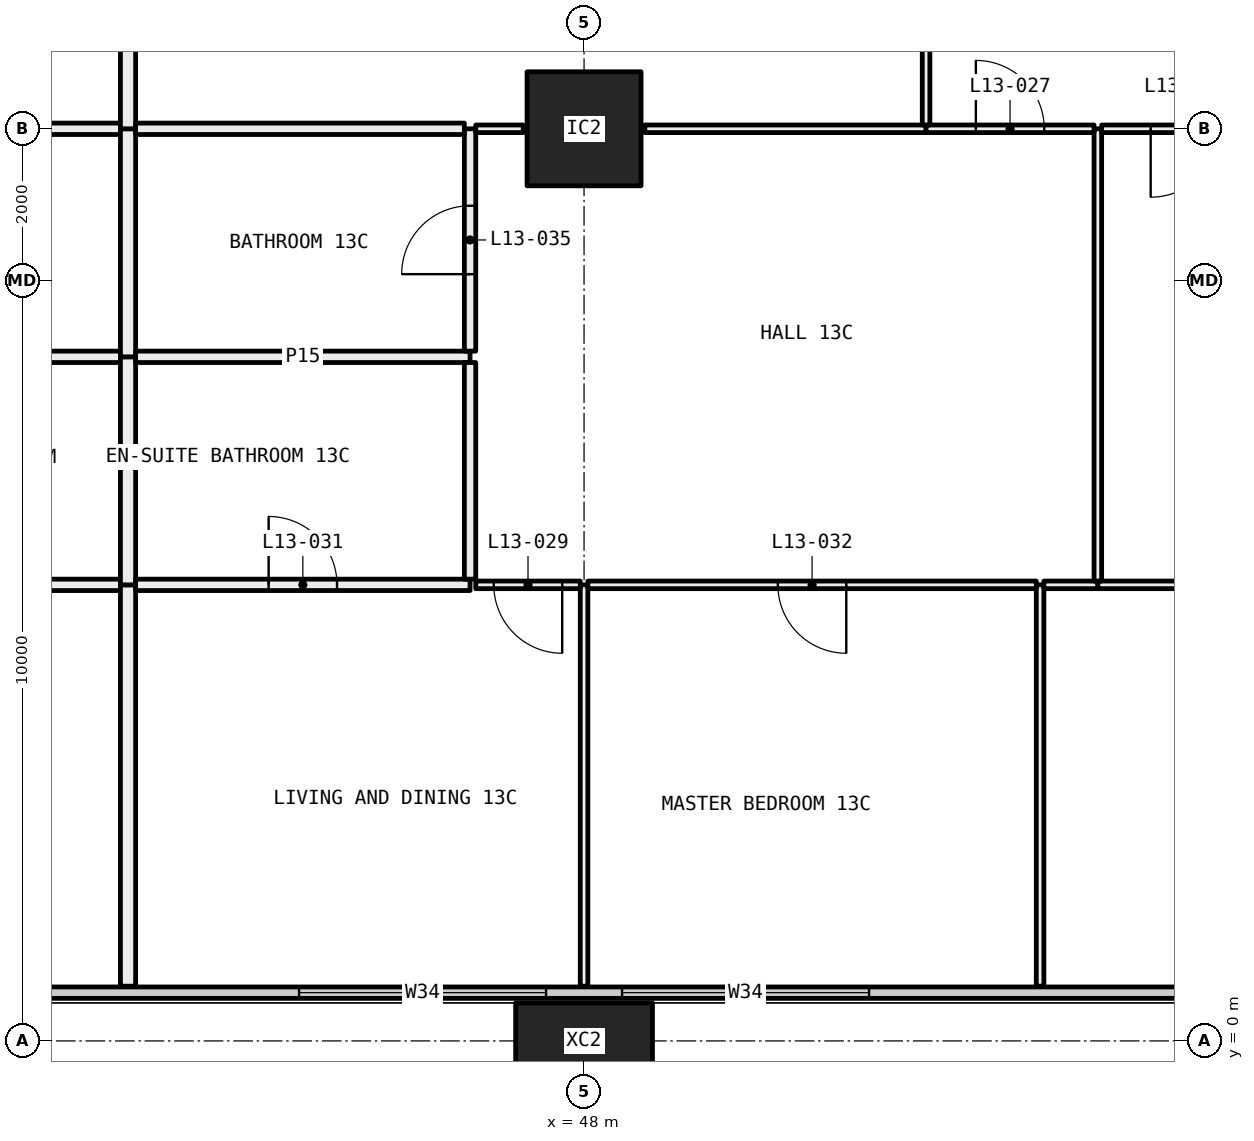
"""IFC4 building model, lengths in metres.
Left out: names, types, materials, properties, quantities, classifications, styles, units other than length and angle.
Written with IfcOpenShell. Run it as: python <this file> out.ifc"""

import sys

from ifc_helpers import new_model, si_unit, direction, frame, frame_2d, origin, origin_2d, place, context, subcontext, project, spatial, rectangle, hollow_rectangle, extrude, element, fill, save


model = new_model("IFC4")
c1 = context("Model", 3, precision=1e-05, world=origin(), true_north=direction((0.0, 1.0)))
c2 = subcontext(c1, "Body", "Model", "MODEL_VIEW")
j1 = project(units=[si_unit("LENGTHUNIT", "METRE"), si_unit("PLANEANGLEUNIT", "RADIAN")], contexts=[c1])
p1 = place(None, origin())
s1 = spatial("IfcSite", under=j1, at=p1, CompositionType="ELEMENT")
p2 = place(p1, origin())
s2 = spatial("IfcBuilding", under=s1, at=p2, CompositionType="ELEMENT")
p3 = place(p2, frame((0.0, 0.0, 57.6)))
s3 = spatial("IfcBuildingStorey", under=s2, at=p3, CompositionType="ELEMENT", Elevation=57.6)
p4 = place(p3, frame((48.0, 0.0, -0.4), z_axis=(0.0, 0.0, 1.0), x_axis=(1.0, 0.0, 0.0)))
e1 = element("IfcColumn", 1, at=p4, inside=s3, PredefinedType="COLUMN", context=c2, shape_type="SweptSolid", body=[
    extrude(hollow_rectangle(XDim=1.8, YDim=1.0, WallThickness=0.07, at=origin_2d()), origin(), (0.0, 0.0, 1.0), 3.45),
])
p5 = place(p3, frame((48.0, 12.0, 0.0), z_axis=(0.0, 0.0, 1.0), x_axis=(1.0, 0.0, 0.0)))
e2 = element("IfcColumn", 2, at=p5, inside=s3, PredefinedType="COLUMN", context=c2, shape_type="SweptSolid", body=[
    extrude(hollow_rectangle(XDim=1.5, YDim=1.5, WallThickness=0.065, at=origin_2d()), origin(), (0.0, 0.0, 1.0), 3.05),
])
p6 = place(p3, frame((6.56, 0.635, 0.0), z_axis=(0.0, 0.0, 1.0), x_axis=(1.0, 0.0, 0.0)))
e3 = element("IfcWall", 3, at=p6, inside=s3, PredefinedType="ELEMENTEDWALL", context=c2, shape_type="SweptSolid", body=[
    extrude(rectangle(XDim=58.88, YDim=0.15, at=frame_2d((29.44, 0.0))), origin(), (0.0, 0.0, 1.0), 3.05),
])
p7 = place(p6, frame((0.44, 0.0, 0.45)))
e4 = element("IfcOpeningElement", 4, at=p7, cuts=e3, PredefinedType="OPENING", context=c2, shape_type="SweptSolid", body=[
    extrude(rectangle(XDim=4.5, YDim=2.55, at=frame_2d((2.25, 1.275))), frame((0.0, 0.085, 0.0), z_axis=(0.0, -1.0, 0.0), x_axis=(1.0, 0.0, 0.0)), (0.0, 0.0, 1.0), 0.17),
])
p8 = place(p6, frame((5.94, 0.0, 0.45)))
e5 = element("IfcOpeningElement", 5, at=p8, cuts=e3, PredefinedType="OPENING", context=c2, shape_type="SweptSolid", body=[
    extrude(rectangle(XDim=3.25, YDim=2.55, at=frame_2d((1.625, 1.275))), frame((0.0, 0.085, 0.0), z_axis=(0.0, -1.0, 0.0), x_axis=(1.0, 0.0, 0.0)), (0.0, 0.0, 1.0), 0.17),
])
p9 = place(p6, frame((13.69, 0.0, 0.45)))
e6 = element("IfcOpeningElement", 6, at=p9, cuts=e3, PredefinedType="OPENING", context=c2, shape_type="SweptSolid", body=[
    extrude(rectangle(XDim=3.25, YDim=2.55, at=frame_2d((1.625, 1.275))), frame((0.0, 0.085, 0.0), z_axis=(0.0, -1.0, 0.0), x_axis=(1.0, 0.0, 0.0)), (0.0, 0.0, 1.0), 0.17),
])
p10 = place(p6, frame((17.94, 0.0, 0.45)))
e7 = element("IfcOpeningElement", 7, at=p10, cuts=e3, PredefinedType="OPENING", context=c2, shape_type="SweptSolid", body=[
    extrude(rectangle(XDim=3.25, YDim=2.55, at=frame_2d((1.625, 1.275))), frame((0.0, 0.085, 0.0), z_axis=(0.0, -1.0, 0.0), x_axis=(1.0, 0.0, 0.0)), (0.0, 0.0, 1.0), 0.17),
])
p11 = place(p6, frame((26.94, 0.0, 0.45)))
e8 = element("IfcOpeningElement", 8, at=p11, cuts=e3, PredefinedType="OPENING", context=c2, shape_type="SweptSolid", body=[
    extrude(rectangle(XDim=2.0, YDim=2.55, at=frame_2d((1.0, 1.275))), frame((0.0, 0.085, 0.0), z_axis=(0.0, -1.0, 0.0), x_axis=(1.0, 0.0, 0.0)), (0.0, 0.0, 1.0), 0.17),
])
p12 = place(p6, frame((29.94, 0.0, 0.45)))
e9 = element("IfcOpeningElement", 9, at=p12, cuts=e3, PredefinedType="OPENING", context=c2, shape_type="SweptSolid", body=[
    extrude(rectangle(XDim=3.25, YDim=2.55, at=frame_2d((1.625, 1.275))), frame((0.0, 0.085, 0.0), z_axis=(0.0, -1.0, 0.0), x_axis=(1.0, 0.0, 0.0)), (0.0, 0.0, 1.0), 0.17),
])
p13 = place(p6, frame((37.69, 0.0, 0.45)))
e10 = element("IfcOpeningElement", 10, at=p13, cuts=e3, PredefinedType="OPENING", context=c2, shape_type="SweptSolid", body=[
    extrude(rectangle(XDim=3.25, YDim=2.55, at=frame_2d((1.625, 1.275))), frame((0.0, 0.085, 0.0), z_axis=(0.0, -1.0, 0.0), x_axis=(1.0, 0.0, 0.0)), (0.0, 0.0, 1.0), 0.17),
])
p14 = place(p6, frame((41.94, 0.0, 0.45)))
e11 = element("IfcOpeningElement", 11, at=p14, cuts=e3, PredefinedType="OPENING", context=c2, shape_type="SweptSolid", body=[
    extrude(rectangle(XDim=3.25, YDim=2.55, at=frame_2d((1.625, 1.275))), frame((0.0, 0.085, 0.0), z_axis=(0.0, -1.0, 0.0), x_axis=(1.0, 0.0, 0.0)), (0.0, 0.0, 1.0), 0.17),
])
p15 = place(p6, frame((50.94, 0.0, 0.45)))
e12 = element("IfcOpeningElement", 12, at=p15, cuts=e3, PredefinedType="OPENING", context=c2, shape_type="SweptSolid", body=[
    extrude(rectangle(XDim=2.0, YDim=2.55, at=frame_2d((1.0, 1.275))), frame((0.0, 0.085, 0.0), z_axis=(0.0, -1.0, 0.0), x_axis=(1.0, 0.0, 0.0)), (0.0, 0.0, 1.0), 0.17),
])
p16 = place(p6, frame((53.94, 0.0, 0.45)))
e13 = element("IfcOpeningElement", 13, at=p16, cuts=e3, PredefinedType="OPENING", context=c2, shape_type="SweptSolid", body=[
    extrude(rectangle(XDim=4.5, YDim=2.55, at=frame_2d((2.25, 1.275))), frame((0.0, 0.085, 0.0), z_axis=(0.0, -1.0, 0.0), x_axis=(1.0, 0.0, 0.0)), (0.0, 0.0, 1.0), 0.17),
])
p17 = place(p3, frame((41.9, 6.0, 0.0), z_axis=(0.0, 0.0, 1.0), x_axis=(-1.0, 0.0, 0.0)))
e14 = element("IfcWall", 14, at=p17, inside=s3, PredefinedType="PARTITIONING", context=c2, shape_type="SweptSolid", body=[
    extrude(rectangle(XDim=4.4, YDim=0.15, at=frame_2d((2.2, 0.0))), origin(), (0.0, 0.0, 1.0), 3.05),
])
p18 = place(p3, frame((42.0, 0.72, 0.0), z_axis=(0.0, 0.0, 1.0), x_axis=(0.0, 1.0, 0.0)))
e15 = element("IfcWall", 15, at=p18, inside=s3, PredefinedType="PARTITIONING", context=c2, shape_type="SweptSolid", body=[
    extrude(rectangle(XDim=5.28, YDim=0.2, at=frame_2d((2.64, 0.0))), origin(), (0.0, 0.0, 1.0), 3.05),
])
p19 = place(p3, frame((41.9, 9.0, 0.0), z_axis=(0.0, 0.0, 1.0), x_axis=(-1.0, 0.0, 0.0)))
e16 = element("IfcWall", 16, at=p19, inside=s3, PredefinedType="PARTITIONING", context=c2, shape_type="SweptSolid", body=[
    extrude(rectangle(XDim=4.325, YDim=0.15, at=frame_2d((2.163, 0.0))), origin(), (0.0, 0.0, 1.0), 3.05),
])
p20 = place(p3, frame((42.0, 6.0, 0.0), z_axis=(0.0, 0.0, 1.0), x_axis=(0.0, 1.0, 0.0)))
e17 = element("IfcWall", 17, at=p20, inside=s3, PredefinedType="PARTITIONING", context=c2, shape_type="SweptSolid", body=[
    extrude(rectangle(XDim=3.0, YDim=0.2, at=frame_2d((1.5, 0.0))), origin(), (0.0, 0.0, 1.0), 3.05),
])
p21 = place(p3, frame((41.9, 12.0, 0.0), z_axis=(0.0, 0.0, 1.0), x_axis=(-1.0, 0.0, 0.0)))
e18 = element("IfcWall", 18, at=p21, inside=s3, PredefinedType="PARTITIONING", context=c2, shape_type="SweptSolid", body=[
    extrude(rectangle(XDim=4.325, YDim=0.15, at=frame_2d((2.163, 0.0))), origin(), (0.0, 0.0, 1.0), 2.45),
])
p22 = place(p3, frame((42.0, 9.0, 0.0), z_axis=(0.0, 0.0, 1.0), x_axis=(0.0, 1.0, 0.0)))
e19 = element("IfcWall", 19, at=p22, inside=s3, PredefinedType="PARTITIONING", context=c2, shape_type="SweptSolid", body=[
    extrude(rectangle(XDim=3.0, YDim=0.2, at=frame_2d((1.5, 0.0))), origin(), (0.0, 0.0, 1.0), 2.45),
])
p23 = place(p3, frame((42.0, 12.0, 0.0), z_axis=(0.0, 0.0, 1.0), x_axis=(0.0, 1.0, 0.0)))
e20 = element("IfcWall", 20, at=p23, inside=s3, PredefinedType="PARTITIONING", context=c2, shape_type="SweptSolid", body=[
    extrude(rectangle(XDim=5.9, YDim=0.2, at=frame_2d((2.95, 0.0))), origin(), (0.0, 0.0, 1.0), 2.45),
])
p24 = place(p3, frame((48.0, 0.72, 0.0), z_axis=(0.0, 0.0, 1.0), x_axis=(0.0, 1.0, 0.0)))
e21 = element("IfcWall", 21, at=p24, inside=s3, PredefinedType="PARTITIONING", context=c2, shape_type="SweptSolid", body=[
    extrude(rectangle(XDim=5.28, YDim=0.1, at=frame_2d((2.64, 0.0))), origin(), (0.0, 0.0, 1.0), 2.45),
])
p25 = place(p3, frame((46.5, 6.0, 0.0), z_axis=(0.0, 0.0, 1.0), x_axis=(-1.0, 0.0, 0.0)))
e22 = element("IfcWall", 22, at=p25, inside=s3, PredefinedType="PARTITIONING", context=c2, shape_type="SweptSolid", body=[
    extrude(rectangle(XDim=4.4, YDim=0.15, at=frame_2d((2.2, 0.0))), origin(), (0.0, 0.0, 1.0), 3.05),
])
p26 = place(p25, frame((1.75, 0.0, 0.0)))
e23 = element("IfcOpeningElement", 23, at=p26, cuts=e22, PredefinedType="OPENING", context=c2, shape_type="SweptSolid", body=[
    extrude(rectangle(XDim=0.9, YDim=2.1, at=frame_2d((0.45, 1.05))), frame((0.0, 0.085, 0.0), z_axis=(0.0, -1.0, 0.0), x_axis=(1.0, 0.0, 0.0)), (0.0, 0.0, 1.0), 0.17),
])
p27 = place(p3, frame((47.95, 6.0, 0.0), z_axis=(0.0, 0.0, 1.0), x_axis=(-1.0, 0.0, 0.0)))
e24 = element("IfcWall", 24, at=p27, inside=s3, PredefinedType="PARTITIONING", context=c2, shape_type="SweptSolid", body=[
    extrude(rectangle(XDim=1.375, YDim=0.1, at=frame_2d((0.688, 0.0))), origin(), (0.0, 0.0, 1.0), 2.45),
])
p28 = place(p27, frame((0.238, 0.0, 0.0)))
e25 = element("IfcOpeningElement", 25, at=p28, cuts=e24, PredefinedType="OPENING", context=c2, shape_type="SweptSolid", body=[
    extrude(rectangle(XDim=0.9, YDim=2.1, at=frame_2d((0.45, 1.05))), frame((0.0, 0.06, 0.0), z_axis=(0.0, -1.0, 0.0), x_axis=(1.0, 0.0, 0.0)), (0.0, 0.0, 1.0), 0.12),
])
p29 = place(p3, frame((54.0, 0.72, 0.0), z_axis=(0.0, 0.0, 1.0), x_axis=(0.0, 1.0, 0.0)))
e26 = element("IfcWall", 26, at=p29, inside=s3, PredefinedType="PARTITIONING", context=c2, shape_type="SweptSolid", body=[
    extrude(rectangle(XDim=5.28, YDim=0.1, at=frame_2d((2.64, 0.0))), origin(), (0.0, 0.0, 1.0), 3.05),
])
p30 = place(p3, frame((53.95, 6.0, 0.0), z_axis=(0.0, 0.0, 1.0), x_axis=(-1.0, 0.0, 0.0)))
e27 = element("IfcWall", 27, at=p30, inside=s3, PredefinedType="PARTITIONING", context=c2, shape_type="SweptSolid", body=[
    extrude(rectangle(XDim=5.9, YDim=0.1, at=frame_2d((2.95, 0.0))), origin(), (0.0, 0.0, 1.0), 2.45),
])
p31 = place(p30, frame((2.5, 0.0, 0.0)))
e28 = element("IfcOpeningElement", 28, at=p31, cuts=e27, PredefinedType="OPENING", context=c2, shape_type="SweptSolid", body=[
    extrude(rectangle(XDim=0.9, YDim=2.1, at=frame_2d((0.45, 1.05))), frame((0.0, 0.06, 0.0), z_axis=(0.0, -1.0, 0.0), x_axis=(1.0, 0.0, 0.0)), (0.0, 0.0, 1.0), 0.12),
])
p32 = place(p3, frame((54.76, 6.0, 0.0), z_axis=(0.0, 0.0, 1.0), x_axis=(-1.0, 0.0, 0.0)))
e29 = element("IfcWall", 29, at=p32, inside=s3, PredefinedType="PARTITIONING", context=c2, shape_type="SweptSolid", body=[
    extrude(rectangle(XDim=0.71, YDim=0.1, at=frame_2d((0.355, 0.0))), origin(), (0.0, 0.0, 1.0), 3.05),
])
p33 = place(p3, frame((59.95, 6.0, 0.0), z_axis=(0.0, 0.0, 1.0), x_axis=(-1.0, 0.0, 0.0)))
e30 = element("IfcWall", 30, at=p33, inside=s3, PredefinedType="PARTITIONING", context=c2, shape_type="SweptSolid", body=[
    extrude(rectangle(XDim=5.19, YDim=0.1, at=frame_2d((2.595, 0.0))), origin(), (0.0, 0.0, 1.0), 2.45),
])
p34 = place(p33, frame((2.145, 0.0, 0.0)))
e31 = element("IfcOpeningElement", 31, at=p34, cuts=e30, PredefinedType="OPENING", context=c2, shape_type="SweptSolid", body=[
    extrude(rectangle(XDim=0.9, YDim=2.1, at=frame_2d((0.45, 1.05))), frame((0.0, 0.06, 0.0), z_axis=(0.0, -1.0, 0.0), x_axis=(1.0, 0.0, 0.0)), (0.0, 0.0, 1.0), 0.12),
])
p35 = place(p3, frame((46.5, 9.0, 0.0), z_axis=(0.0, 0.0, 1.0), x_axis=(-1.0, 0.0, 0.0)))
e32 = element("IfcWall", 32, at=p35, inside=s3, PredefinedType="PARTITIONING", context=c2, shape_type="SweptSolid", body=[
    extrude(rectangle(XDim=4.4, YDim=0.15, at=frame_2d((2.2, 0.0))), origin(), (0.0, 0.0, 1.0), 3.05),
])
p36 = place(p3, frame((46.5, 6.075, 0.0), z_axis=(0.0, 0.0, 1.0), x_axis=(0.0, 1.0, 0.0)))
e33 = element("IfcWall", 33, at=p36, inside=s3, PredefinedType="PARTITIONING", context=c2, shape_type="SweptSolid", body=[
    extrude(rectangle(XDim=2.85, YDim=0.15, at=frame_2d((1.425, 0.0))), origin(), (0.0, 0.0, 1.0), 3.05),
])
p37 = place(p3, frame((46.5, 9.075, 0.0), z_axis=(0.0, 0.0, 1.0), x_axis=(0.0, 1.0, 0.0)))
e34 = element("IfcWall", 34, at=p37, inside=s3, PredefinedType="PARTITIONING", context=c2, shape_type="SweptSolid", body=[
    extrude(rectangle(XDim=2.925, YDim=0.15, at=frame_2d((1.462, 0.0))), origin(), (0.0, 0.0, 1.0), 2.45),
])
p38 = place(p37, frame((1.012, 0.0, 0.0)))
e35 = element("IfcOpeningElement", 35, at=p38, cuts=e34, PredefinedType="OPENING", context=c2, shape_type="SweptSolid", body=[
    extrude(rectangle(XDim=0.9, YDim=2.1, at=frame_2d((0.45, 1.05))), frame((0.0, 0.085, 0.0), z_axis=(0.0, -1.0, 0.0), x_axis=(1.0, 0.0, 0.0)), (0.0, 0.0, 1.0), 0.17),
])
p39 = place(p3, frame((46.425, 12.0, 0.0), z_axis=(0.0, 0.0, 1.0), x_axis=(-1.0, 0.0, 0.0)))
e36 = element("IfcWall", 36, at=p39, inside=s3, PredefinedType="PARTITIONING", context=c2, shape_type="SweptSolid", body=[
    extrude(rectangle(XDim=4.325, YDim=0.15, at=frame_2d((2.163, 0.0))), origin(), (0.0, 0.0, 1.0), 2.45),
])
p40 = place(p3, frame((54.76, 6.05, 0.0), z_axis=(0.0, 0.0, 1.0), x_axis=(0.0, 1.0, 0.0)))
e37 = element("IfcWall", 37, at=p40, inside=s3, PredefinedType="PARTITIONING", context=c2, shape_type="SweptSolid", body=[
    extrude(rectangle(XDim=5.95, YDim=0.1, at=frame_2d((2.975, 0.0))), origin(), (0.0, 0.0, 1.0), 2.45),
])
p41 = place(p3, frame((47.2, 12.0, 0.0), z_axis=(0.0, 0.0, 1.0), x_axis=(-1.0, 0.0, 0.0)))
e38 = element("IfcWall", 38, at=p41, inside=s3, PredefinedType="PARTITIONING", context=c2, shape_type="SweptSolid", body=[
    extrude(rectangle(XDim=0.625, YDim=0.1, at=frame_2d((0.312, 0.0))), origin(), (0.0, 0.0, 1.0), 2.45),
])
p42 = place(p3, frame((52.5, 12.0, 0.0), z_axis=(0.0, 0.0, 1.0), x_axis=(-1.0, 0.0, 0.0)))
e39 = element("IfcWall", 39, at=p42, inside=s3, PredefinedType="PARTITIONING", context=c2, shape_type="SweptSolid", body=[
    extrude(rectangle(XDim=3.7, YDim=0.1, at=frame_2d((1.85, 0.0))), origin(), (0.0, 0.0, 1.0), 2.45),
])
p43 = place(p3, frame((54.71, 12.0, 0.0), z_axis=(0.0, 0.0, 1.0), x_axis=(-1.0, 0.0, 0.0)))
e40 = element("IfcWall", 40, at=p43, inside=s3, PredefinedType="PARTITIONING", context=c2, shape_type="SweptSolid", body=[
    extrude(rectangle(XDim=2.21, YDim=0.1, at=frame_2d((1.105, 0.0))), origin(), (0.0, 0.0, 1.0), 2.45),
])
p44 = place(p43, frame((0.655, 0.0, 0.0)))
e41 = element("IfcOpeningElement", 41, at=p44, cuts=e40, PredefinedType="OPENING", context=c2, shape_type="SweptSolid", body=[
    extrude(rectangle(XDim=0.9, YDim=2.1, at=frame_2d((0.45, 1.05))), frame((0.0, 0.06, 0.0), z_axis=(0.0, -1.0, 0.0), x_axis=(1.0, 0.0, 0.0)), (0.0, 0.0, 1.0), 0.12),
])
p45 = place(p3, frame((57.0, 12.0, 0.0), z_axis=(0.0, 0.0, 1.0), x_axis=(-1.0, 0.0, 0.0)))
e42 = element("IfcWall", 42, at=p45, inside=s3, PredefinedType="PARTITIONING", context=c2, shape_type="SweptSolid", body=[
    extrude(rectangle(XDim=2.19, YDim=0.1, at=frame_2d((1.095, 0.0))), origin(), (0.0, 0.0, 1.0), 2.45),
])
p46 = place(p45, frame((0.645, 0.0, 0.0)))
e43 = element("IfcOpeningElement", 43, at=p46, cuts=e42, PredefinedType="OPENING", context=c2, shape_type="SweptSolid", body=[
    extrude(rectangle(XDim=0.9, YDim=2.1, at=frame_2d((0.45, 1.05))), frame((0.0, 0.06, 0.0), z_axis=(0.0, -1.0, 0.0), x_axis=(1.0, 0.0, 0.0)), (0.0, 0.0, 1.0), 0.12),
])
p47 = place(p3, frame((52.5, 12.05, 0.0), z_axis=(0.0, 0.0, 1.0), x_axis=(0.0, 1.0, 0.0)))
e44 = element("IfcWall", 44, at=p47, inside=s3, PredefinedType="PARTITIONING", context=c2, shape_type="SweptSolid", body=[
    extrude(rectangle(XDim=5.85, YDim=0.1, at=frame_2d((2.925, 0.0))), origin(), (0.0, 0.0, 1.0), 2.45),
])
p48 = place(p47, frame((2.475, 0.0, 0.0)))
e45 = element("IfcOpeningElement", 45, at=p48, cuts=e44, PredefinedType="OPENING", context=c2, shape_type="SweptSolid", body=[
    extrude(rectangle(XDim=0.9, YDim=2.1, at=frame_2d((0.45, 1.05))), frame((0.0, 0.06, 0.0), z_axis=(0.0, -1.0, 0.0), x_axis=(1.0, 0.0, 0.0)), (0.0, 0.0, 1.0), 0.12),
])
p49 = place(p13, origin())
e46 = element("IfcWindow", 46, at=p49, inside=s3, PartitioningType="SINGLE_PANEL", PredefinedType="WINDOW", context=c2, shape_type="SweptSolid", body=[
    extrude(rectangle(XDim=3.25, YDim=2.55, at=frame_2d((1.625, 1.275))), frame((0.0, 0.03, 0.0), z_axis=(0.0, -1.0, 0.0), x_axis=(1.0, 0.0, 0.0)), (0.0, 0.0, 1.0), 0.06),
])
fill(e10, e46)
p50 = place(p14, origin())
e47 = element("IfcWindow", 47, at=p50, inside=s3, PartitioningType="SINGLE_PANEL", PredefinedType="WINDOW", context=c2, shape_type="SweptSolid", body=[
    extrude(rectangle(XDim=3.25, YDim=2.55, at=frame_2d((1.625, 1.275))), frame((0.0, 0.03, 0.0), z_axis=(0.0, -1.0, 0.0), x_axis=(1.0, 0.0, 0.0)), (0.0, 0.0, 1.0), 0.06),
])
fill(e11, e47)
p51 = place(p44, frame((0.9, 0.0, 0.0), x_axis=(-1.0, 0.0, 0.0)))
e48 = element("IfcDoor", 48, at=p51, inside=s3, OperationType="SINGLE_SWING_RIGHT", PredefinedType="DOOR", context=c2, shape_type="SweptSolid", body=[
    extrude(rectangle(XDim=0.9, YDim=2.1, at=frame_2d((0.45, 1.05))), frame((0.0, 0.025, 0.0), z_axis=(0.0, -1.0, 0.0), x_axis=(1.0, 0.0, 0.0)), (0.0, 0.0, 1.0), 0.05),
])
fill(e41, e48)
p52 = place(p46, origin())
e49 = element("IfcDoor", 49, at=p52, inside=s3, OperationType="SINGLE_SWING_LEFT", PredefinedType="DOOR", context=c2, shape_type="SweptSolid", body=[
    extrude(rectangle(XDim=0.9, YDim=2.1, at=frame_2d((0.45, 1.05))), frame((0.0, 0.025, 0.0), z_axis=(0.0, -1.0, 0.0), x_axis=(1.0, 0.0, 0.0)), (0.0, 0.0, 1.0), 0.05),
])
fill(e43, e49)
p53 = place(p28, origin())
e50 = element("IfcDoor", 50, at=p53, inside=s3, OperationType="SINGLE_SWING_RIGHT", PredefinedType="DOOR", context=c2, shape_type="SweptSolid", body=[
    extrude(rectangle(XDim=0.9, YDim=2.1, at=frame_2d((0.45, 1.05))), frame((0.0, 0.025, 0.0), z_axis=(0.0, -1.0, 0.0), x_axis=(1.0, 0.0, 0.0)), (0.0, 0.0, 1.0), 0.05),
])
fill(e25, e50)
p54 = place(p26, frame((0.9, 0.0, 0.0), x_axis=(-1.0, 0.0, 0.0)))
e51 = element("IfcDoor", 51, at=p54, inside=s3, OperationType="SINGLE_SWING_RIGHT", PredefinedType="DOOR", context=c2, shape_type="SweptSolid", body=[
    extrude(rectangle(XDim=0.9, YDim=2.1, at=frame_2d((0.45, 1.05))), frame((0.0, 0.025, 0.0), z_axis=(0.0, -1.0, 0.0), x_axis=(1.0, 0.0, 0.0)), (0.0, 0.0, 1.0), 0.05),
])
fill(e23, e51)
p55 = place(p31, origin())
e52 = element("IfcDoor", 52, at=p55, inside=s3, OperationType="SINGLE_SWING_RIGHT", PredefinedType="DOOR", context=c2, shape_type="SweptSolid", body=[
    extrude(rectangle(XDim=0.9, YDim=2.1, at=frame_2d((0.45, 1.05))), frame((0.0, 0.025, 0.0), z_axis=(0.0, -1.0, 0.0), x_axis=(1.0, 0.0, 0.0)), (0.0, 0.0, 1.0), 0.05),
])
fill(e28, e52)
p56 = place(p38, origin())
e53 = element("IfcDoor", 53, at=p56, inside=s3, OperationType="SINGLE_SWING_RIGHT", PredefinedType="DOOR", context=c2, shape_type="SweptSolid", body=[
    extrude(rectangle(XDim=0.9, YDim=2.1, at=frame_2d((0.45, 1.05))), frame((0.0, 0.025, 0.0), z_axis=(0.0, -1.0, 0.0), x_axis=(1.0, 0.0, 0.0)), (0.0, 0.0, 1.0), 0.05),
])
fill(e35, e53)
save(model, sys.argv[1])
